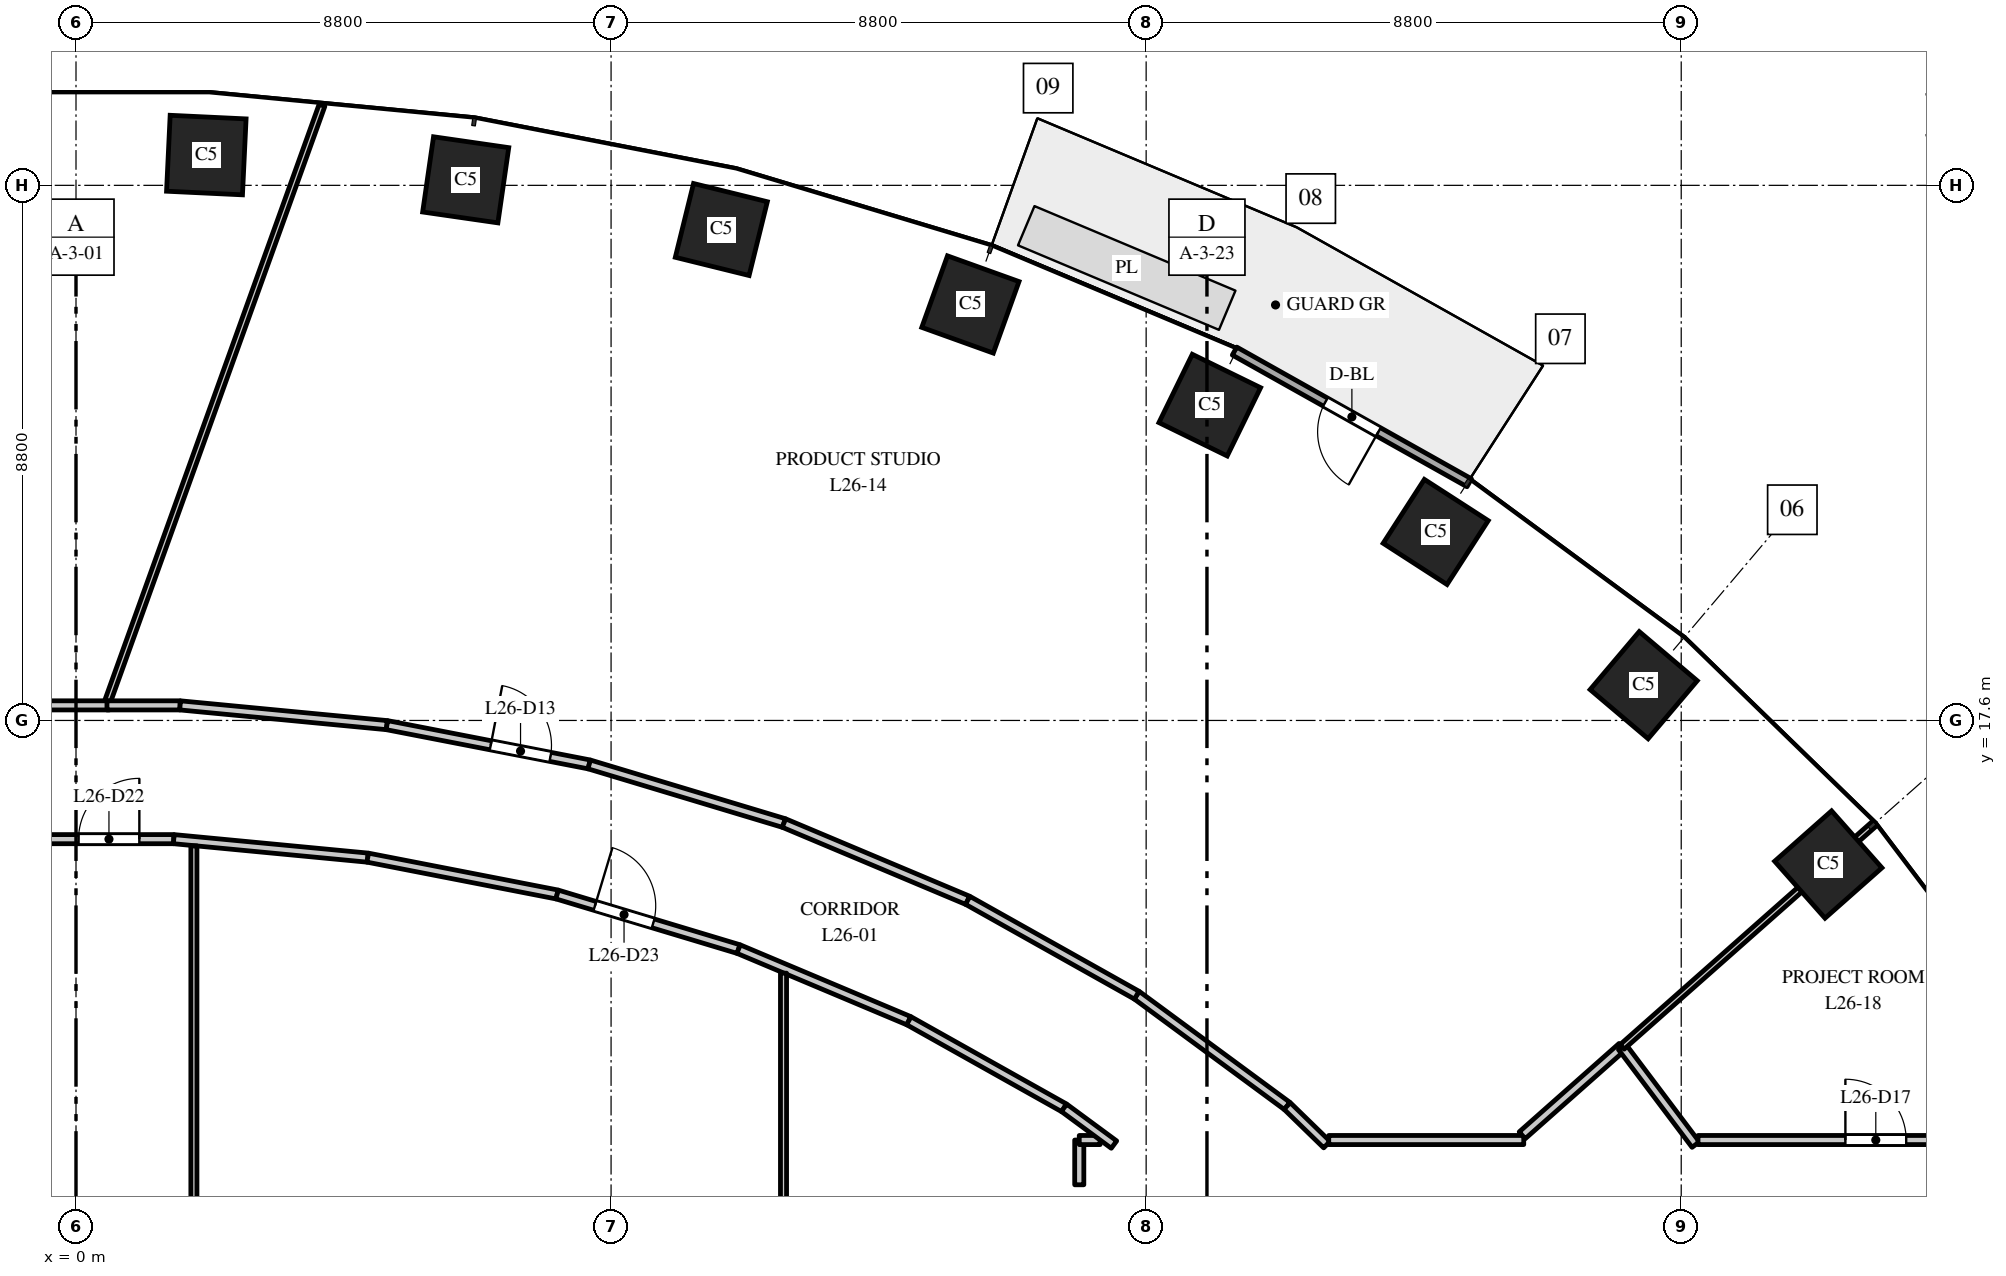
"""IFC4 building model, lengths in metres.
Left out: names, types, materials, properties, quantities, classifications, styles, units other than length and angle.
Written with IfcOpenShell. Run it as: python <this file> out.ifc"""

import sys

from ifc_helpers import new_model, si_unit, direction, frame, frame_2d, origin, origin_2d, place, context, subcontext, project, spatial, rectangle, extrude, element, fill, save


model = new_model("IFC4")
c1 = context("Model", 3, precision=1e-05, world=origin(), true_north=direction((0.0, 1.0)))
c2 = subcontext(c1, "Body", "Model", "MODEL_VIEW")
j1 = project(units=[si_unit("LENGTHUNIT", "METRE"), si_unit("PLANEANGLEUNIT", "RADIAN")], contexts=[c1])
p1 = place(None, origin())
s1 = spatial("IfcSite", under=j1, at=p1, CompositionType="ELEMENT")
p2 = place(p1, origin())
s2 = spatial("IfcBuilding", under=s1, at=p2, CompositionType="ELEMENT")
p3 = place(p2, frame((0.0, 0.0, 116.0)))
s3 = spatial("IfcBuildingStorey", under=s2, at=p3, CompositionType="ELEMENT", Elevation=116.0)
for number, where, z_axis, x_axis in (
    (1, (28.819, 15.23, 0.0), (0.0, 0.0, 1.0), (-0.663, 0.749, 0.0)),
    (2, (25.783, 18.18, 0.0), (0.0, 0.0, 1.0), (-0.763, 0.646, 0.0)),
    (3, (22.362, 20.7, 0.0), (0.0, 0.0, 1.0), (-0.84, 0.542, 0.0)),
    (4, (18.646, 22.785, 0.0), (0.0, 0.0, 1.0), (-0.898, 0.439, 0.0)),
    (5, (14.709, 24.441, 0.0), (0.0, 0.0, 1.0), (-0.941, 0.338, 0.0)),
    (6, (10.613, 25.674, 0.0), (0.0, 0.0, 1.0), (-0.971, 0.24, 0.0)),
    (7, (6.409, 26.491, 0.0), (0.0, 0.0, 1.0), (-0.99, 0.143, 0.0)),
    (8, (2.143, 26.898, 0.0), (0.0, 0.0, 1.0), (-0.999, 0.048, 0.0)),
):
    element("IfcColumn", number, at=place(p3, frame(where, z_axis=z_axis, x_axis=x_axis)), inside=s3, PredefinedType="COLUMN", context=c2, shape_type="SweptSolid", body=[
        extrude(rectangle(XDim=1.25, YDim=1.25, at=origin_2d()), origin(), (0.0, 0.0, 1.0), 4.0),
    ])
p4 = place(p3, frame((22.913, 21.509, 0.0), z_axis=(0.0, 0.0, 1.0), x_axis=(-0.872046572975, 0.489422899509, 0.0)))
e9 = element("IfcWall", 9, at=p4, inside=s3, PredefinedType="STANDARD", context=c2, shape_type="SweptSolid", body=[
    extrude(rectangle(XDim=4.426, YDim=0.15, at=frame_2d((2.213, 0.0))), origin(), (0.0, 0.0, 1.0), 3.7),
])
p5 = place(p4, frame((1.713, 0.0, 0.0)))
e10 = element("IfcOpeningElement", 10, at=p5, cuts=e9, PredefinedType="OPENING", context=c2, shape_type="SweptSolid", body=[
    extrude(rectangle(XDim=1.0, YDim=2.4, at=frame_2d((0.5, 1.2))), frame((0.0, 0.085, 0.0), z_axis=(0.0, -1.0, 0.0), x_axis=(1.0, 0.0, 0.0)), (0.0, 0.0, 1.0), 0.17),
])
p6 = place(p3, frame((-1.712, 17.848, 0.0), z_axis=(0.0, 0.0, 1.0), x_axis=(1.0, 0.0, 0.0)))
e11 = element("IfcWall", 11, at=p6, inside=s3, PredefinedType="PARTITIONING", context=c2, shape_type="SweptSolid", body=[
    extrude(rectangle(XDim=2.262, YDim=0.15, at=frame_2d((1.131, 0.0))), origin(), (0.0, 0.0, 1.0), 2.85),
])
p7 = place(p3, frame((-1.608, 15.648, 0.0), z_axis=(0.0, 0.0, 1.0), x_axis=(1.0, 0.0, 0.0)))
e12 = element("IfcWall", 12, at=p7, inside=s3, PredefinedType="PARTITIONING", context=c2, shape_type="SweptSolid", body=[
    extrude(rectangle(XDim=3.216, YDim=0.15, at=frame_2d((1.608, 0.0))), origin(), (0.0, 0.0, 1.0), 2.85),
])
p8 = place(p7, frame((1.65, 0.0, 0.0)))
e13 = element("IfcOpeningElement", 13, at=p8, cuts=e12, PredefinedType="OPENING", context=c2, shape_type="SweptSolid", body=[
    extrude(rectangle(XDim=1.0, YDim=2.1, at=frame_2d((0.5, 1.05))), frame((0.0, 0.085, 0.0), z_axis=(0.0, -1.0, 0.0), x_axis=(1.0, 0.0, 0.0)), (0.0, 0.0, 1.0), 0.17),
])
p9 = place(p3, frame((0.523, 17.923, 0.0), z_axis=(0.0, 0.0, 1.0), x_axis=(0.338475258228, 0.940975291688, 0.0)))
e14 = element("IfcWall", 14, at=p9, inside=s3, PredefinedType="PARTITIONING", context=c2, shape_type="SweptSolid", body=[
    extrude(rectangle(XDim=10.408, YDim=0.1, at=frame_2d((5.204, 0.0))), origin(), (0.0, 0.0, 1.0), 2.9),
])
p10 = place(p3, frame((0.509, 17.848, 0.0), z_axis=(0.0, 0.0, 1.0), x_axis=(1.0, 0.0, 0.0)))
e15 = element("IfcWall", 15, at=p10, inside=s3, PredefinedType="PARTITIONING", context=c2, shape_type="SweptSolid", body=[
    extrude(rectangle(XDim=1.203, YDim=0.15, at=frame_2d((0.602, 0.0))), origin(), (0.0, 0.0, 1.0), 3.7),
])
p11 = place(p3, frame((1.608, 15.648, 0.0), z_axis=(0.0, 0.0, 1.0), x_axis=(0.995491705426, -0.09484863957, 0.0)))
e16 = element("IfcWall", 16, at=p11, inside=s3, PredefinedType="PARTITIONING", context=c2, shape_type="SweptSolid", body=[
    extrude(rectangle(XDim=3.205, YDim=0.15, at=frame_2d((1.602, 0.0))), origin(), (0.0, 0.0, 1.0), 2.85),
])
p12 = place(p3, frame((1.712, 17.848, 0.0), z_axis=(0.0, 0.0, 1.0), x_axis=(0.995466844572, -0.095109207532, 0.0)))
e17 = element("IfcWall", 17, at=p12, inside=s3, PredefinedType="PARTITIONING", context=c2, shape_type="SweptSolid", body=[
    extrude(rectangle(XDim=3.417, YDim=0.15, at=frame_2d((1.708, 0.0))), origin(), (0.0, 0.0, 1.0), 2.85),
])
p13 = place(p3, frame((1.939, 7.307, 0.0), z_axis=(0.0, 0.0, 1.0), x_axis=(0.0, 1.0, 0.0)))
e18 = element("IfcWall", 18, at=p13, inside=s3, PredefinedType="PARTITIONING", context=c2, shape_type="SweptSolid", body=[
    extrude(rectangle(XDim=8.23, YDim=0.1, at=frame_2d((4.115, 0.0))), origin(), (0.0, 0.0, 1.0), 2.85),
])
p14 = place(p3, frame((4.798, 15.344, 0.0), z_axis=(0.0, 0.0, 1.0), x_axis=(0.981588545092, -0.191007665145, 0.0)))
e19 = element("IfcWall", 19, at=p14, inside=s3, PredefinedType="PARTITIONING", context=c2, shape_type="SweptSolid", body=[
    extrude(rectangle(XDim=3.172, YDim=0.15, at=frame_2d((1.586, 0.0))), origin(), (0.0, 0.0, 1.0), 3.7),
])
p15 = place(p3, frame((5.113, 17.523, 0.0), z_axis=(0.0, 0.0, 1.0), x_axis=(0.981665220565, -0.190613207134, 0.0)))
e20 = element("IfcWall", 20, at=p15, inside=s3, PredefinedType="PARTITIONING", context=c2, shape_type="SweptSolid", body=[
    extrude(rectangle(XDim=3.389, YDim=0.15, at=frame_2d((1.695, 0.0))), origin(), (0.0, 0.0, 1.0), 3.7),
])
p16 = place(p15, frame((1.739, 0.0, 0.0)))
e21 = element("IfcOpeningElement", 21, at=p16, cuts=e20, PredefinedType="OPENING", context=c2, shape_type="SweptSolid", body=[
    extrude(rectangle(XDim=1.0, YDim=2.1, at=frame_2d((0.5, 1.05))), frame((0.0, 0.085, 0.0), z_axis=(0.0, -1.0, 0.0), x_axis=(1.0, 0.0, 0.0)), (0.0, 0.0, 1.0), 0.17),
])
p17 = place(p3, frame((7.912, 14.738, 0.0), z_axis=(0.0, 0.0, 1.0), x_axis=(0.957606118849, -0.28808075455, 0.0)))
e22 = element("IfcWall", 22, at=p17, inside=s3, PredefinedType="PARTITIONING", context=c2, shape_type="SweptSolid", body=[
    extrude(rectangle(XDim=3.117, YDim=0.15, at=frame_2d((1.559, 0.0))), origin(), (0.0, 0.0, 1.0), 2.85),
])
p18 = place(p17, frame((0.65, 0.0, 0.0)))
e23 = element("IfcOpeningElement", 23, at=p18, cuts=e22, PredefinedType="OPENING", context=c2, shape_type="SweptSolid", body=[
    extrude(rectangle(XDim=1.0, YDim=2.1, at=frame_2d((0.5, 1.05))), frame((0.0, 0.085, 0.0), z_axis=(0.0, -1.0, 0.0), x_axis=(1.0, 0.0, 0.0)), (0.0, 0.0, 1.0), 0.17),
])
p19 = place(p3, frame((8.44, 16.877, 0.0), z_axis=(0.0, 0.0, 1.0), x_axis=(0.957584891346, -0.288151307243, 0.0)))
e24 = element("IfcWall", 24, at=p19, inside=s3, PredefinedType="PARTITIONING", context=c2, shape_type="SweptSolid", body=[
    extrude(rectangle(XDim=3.345, YDim=0.15, at=frame_2d((1.672, 0.0))), origin(), (0.0, 0.0, 1.0), 2.85),
])
p20 = place(p3, frame((10.897, 13.84, 0.0), z_axis=(0.0, 0.0, 1.0), x_axis=(0.921751821358, -0.387780324183, 0.0)))
e25 = element("IfcWall", 25, at=p20, inside=s3, PredefinedType="PARTITIONING", context=c2, shape_type="SweptSolid", body=[
    extrude(rectangle(XDim=3.038, YDim=0.15, at=frame_2d((1.519, 0.0))), origin(), (0.0, 0.0, 1.0), 3.7),
])
p21 = place(p3, frame((11.636, -13.444, 0.0), z_axis=(0.0, 0.0, 1.0), x_axis=(0.0, 1.0, 0.0)))
e26 = element("IfcWall", 26, at=p21, inside=s3, PredefinedType="PARTITIONING", context=c2, shape_type="SweptSolid", body=[
    extrude(rectangle(XDim=26.888, YDim=0.1, at=frame_2d((13.444, 0.0))), origin(), (0.0, 0.0, 1.0), 2.75),
])
p22 = place(p3, frame((11.643, 15.913, 0.0), z_axis=(0.0, 0.0, 1.0), x_axis=(0.921789499058, -0.38769075231, 0.0)))
e27 = element("IfcWall", 27, at=p22, inside=s3, PredefinedType="PARTITIONING", context=c2, shape_type="SweptSolid", body=[
    extrude(rectangle(XDim=3.278, YDim=0.15, at=frame_2d((1.639, 0.0))), origin(), (0.0, 0.0, 1.0), 3.7),
])
p23 = place(p3, frame((13.697, 12.662, 0.0), z_axis=(0.0, 0.0, 1.0), x_axis=(0.872147381065, -0.489243237767, 0.0)))
e28 = element("IfcWall", 28, at=p23, inside=s3, PredefinedType="PARTITIONING", context=c2, shape_type="SweptSolid", body=[
    extrude(rectangle(XDim=2.927, YDim=0.15, at=frame_2d((1.464, 0.0))), origin(), (0.0, 0.0, 1.0), 3.7),
])
p24 = place(p3, frame((14.665, 14.642, 0.0), z_axis=(0.0, 0.0, 1.0), x_axis=(0.872072095629, -0.489377420837, 0.0)))
e29 = element("IfcWall", 29, at=p24, inside=s3, PredefinedType="PARTITIONING", context=c2, shape_type="SweptSolid", body=[
    extrude(rectangle(XDim=3.188, YDim=0.15, at=frame_2d((1.594, 0.0))), origin(), (0.0, 0.0, 1.0), 3.7),
])
p25 = place(p3, frame((16.25, 11.23, 0.0), z_axis=(0.0, 0.0, 1.0), x_axis=(0.805055837353, -0.59319903805, 0.0)))
e30 = element("IfcWall", 30, at=p25, inside=s3, PredefinedType="PARTITIONING", context=c2, shape_type="SweptSolid", body=[
    extrude(rectangle(XDim=1.02, YDim=0.15, at=frame_2d((0.51, 0.0))), origin(), (0.0, 0.0, 1.0), 3.7),
])
p26 = place(p3, frame((16.5, 9.964, 0.0), z_axis=(0.0, 0.0, 1.0), x_axis=(0.0, 1.0, 0.0)))
e31 = element("IfcWall", 31, at=p26, inside=s3, PredefinedType="PARTITIONING", context=c2, shape_type="SweptSolid", body=[
    extrude(rectangle(XDim=0.736, YDim=0.15, at=frame_2d((0.368, 0.0))), origin(), (0.0, 0.0, 1.0), 3.7),
])
p27 = place(p3, frame((16.5, 10.7, 0.0), z_axis=(0.0, 0.0, 1.0), x_axis=(1.0, 0.0, 0.0)))
e32 = element("IfcWall", 32, at=p27, inside=s3, PredefinedType="PARTITIONING", context=c2, shape_type="SweptSolid", body=[
    extrude(rectangle(XDim=0.343, YDim=0.15, at=frame_2d((0.171, 0.0))), origin(), (0.0, 0.0, 1.0), 3.7),
])
p28 = place(p3, frame((17.445, 13.082, 0.0), z_axis=(0.0, 0.0, 1.0), x_axis=(0.805185638843, -0.593022838516, 0.0)))
e33 = element("IfcWall", 33, at=p28, inside=s3, PredefinedType="PARTITIONING", context=c2, shape_type="SweptSolid", body=[
    extrude(rectangle(XDim=3.073, YDim=0.15, at=frame_2d((1.536, 0.0))), origin(), (0.0, 0.0, 1.0), 3.7),
])
p29 = place(p3, frame((19.919, 11.26, 0.0), z_axis=(0.0, 0.0, 1.0), x_axis=(0.716953986293, -0.697120492841, 0.0)))
e34 = element("IfcWall", 34, at=p29, inside=s3, PredefinedType="PARTITIONING", context=c2, shape_type="SweptSolid", body=[
    extrude(rectangle(XDim=0.911, YDim=0.15, at=frame_2d((0.456, 0.0))), origin(), (0.0, 0.0, 1.0), 2.75),
])
p30 = place(p3, frame((20.603, 10.7, 0.0), z_axis=(0.0, 0.0, 1.0), x_axis=(1.0, 0.0, 0.0)))
e35 = element("IfcWall", 35, at=p30, inside=s3, PredefinedType="PARTITIONING", context=c2, shape_type="SweptSolid", body=[
    extrude(rectangle(XDim=3.207, YDim=0.15, at=frame_2d((1.604, 0.0))), origin(), (0.0, 0.0, 1.0), 3.7),
])
p31 = place(p3, frame((23.785, 10.778, 0.0), z_axis=(0.0, 0.0, 1.0), x_axis=(0.748911595987, 0.662669918886, 0.0)))
e36 = element("IfcWall", 36, at=p31, inside=s3, PredefinedType="PARTITIONING", context=c2, shape_type="SweptSolid", body=[
    extrude(rectangle(XDim=2.194, YDim=0.15, at=frame_2d((1.097, 0.0))), origin(), (0.0, 0.0, 1.0), 3.7),
])
p32 = place(p3, frame((25.428, 12.232, 0.0), z_axis=(0.0, 0.0, 1.0), x_axis=(0.601513631979, -0.798862535449, 0.0)))
e37 = element("IfcWall", 37, at=p32, inside=s3, PredefinedType="PARTITIONING", context=c2, shape_type="SweptSolid", body=[
    extrude(rectangle(XDim=2.011, YDim=0.15, at=frame_2d((1.006, 0.0))), origin(), (0.0, 0.0, 1.0), 3.7),
])
p33 = place(p3, frame((25.428, 12.232, 0.0), z_axis=(0.0, 0.0, 1.0), x_axis=(0.749015105068, 0.662552920437, 0.0)))
e38 = element("IfcWall", 38, at=p33, inside=s3, PredefinedType="PARTITIONING", context=c2, shape_type="SweptSolid", body=[
    extrude(rectangle(XDim=5.529, YDim=0.1, at=frame_2d((2.764, 0.0))), origin(), (0.0, 0.0, 1.0), 3.7),
])
p34 = place(p3, frame((26.676, 10.7, 0.0), z_axis=(0.0, 0.0, 1.0), x_axis=(1.0, 0.0, 0.0)))
e39 = element("IfcWall", 39, at=p34, inside=s3, PredefinedType="PARTITIONING", context=c2, shape_type="SweptSolid", body=[
    extrude(rectangle(XDim=4.824, YDim=0.15, at=frame_2d((2.412, 0.0))), origin(), (0.0, 0.0, 1.0), 2.9),
])
p35 = place(p34, frame((2.424, 0.0, 0.0)))
e40 = element("IfcOpeningElement", 40, at=p35, cuts=e39, PredefinedType="OPENING", context=c2, shape_type="SweptSolid", body=[
    extrude(rectangle(XDim=1.0, YDim=2.1, at=frame_2d((0.5, 1.05))), frame((0.0, 0.085, 0.0), z_axis=(0.0, -1.0, 0.0), x_axis=(1.0, 0.0, 0.0)), (0.0, 0.0, 1.0), 0.17),
])
p36 = place(p5, origin())
e41 = element("IfcDoor", 41, at=p36, inside=s3, OperationType="SINGLE_SWING_LEFT", PredefinedType="DOOR", context=c2, shape_type="SweptSolid", body=[
    extrude(rectangle(XDim=1.0, YDim=2.4, at=frame_2d((0.5, 1.2))), frame((0.0, 0.025, 0.0), z_axis=(0.0, -1.0, 0.0), x_axis=(1.0, 0.0, 0.0)), (0.0, 0.0, 1.0), 0.05),
])
fill(e10, e41)
p37 = place(p16, origin())
e42 = element("IfcDoor", 42, at=p37, inside=s3, OperationType="SINGLE_SWING_LEFT", PredefinedType="DOOR", context=c2, shape_type="SweptSolid", body=[
    extrude(rectangle(XDim=1.0, YDim=2.1, at=frame_2d((0.5, 1.05))), frame((0.0, 0.025, 0.0), z_axis=(0.0, -1.0, 0.0), x_axis=(1.0, 0.0, 0.0)), (0.0, 0.0, 1.0), 0.05),
])
fill(e21, e42)
p38 = place(p35, origin())
e43 = element("IfcDoor", 43, at=p38, inside=s3, OperationType="SINGLE_SWING_LEFT", PredefinedType="DOOR", context=c2, shape_type="SweptSolid", body=[
    extrude(rectangle(XDim=1.0, YDim=2.1, at=frame_2d((0.5, 1.05))), frame((0.0, 0.025, 0.0), z_axis=(0.0, -1.0, 0.0), x_axis=(1.0, 0.0, 0.0)), (0.0, 0.0, 1.0), 0.05),
])
fill(e40, e43)
p39 = place(p8, origin())
e44 = element("IfcDoor", 44, at=p39, inside=s3, OperationType="SINGLE_SWING_RIGHT", PredefinedType="DOOR", context=c2, shape_type="SweptSolid", body=[
    extrude(rectangle(XDim=1.0, YDim=2.1, at=frame_2d((0.5, 1.05))), frame((0.0, 0.025, 0.0), z_axis=(0.0, -1.0, 0.0), x_axis=(1.0, 0.0, 0.0)), (0.0, 0.0, 1.0), 0.05),
])
fill(e13, e44)
p40 = place(p18, origin())
e45 = element("IfcDoor", 45, at=p40, inside=s3, OperationType="SINGLE_SWING_LEFT", PredefinedType="DOOR", context=c2, shape_type="SweptSolid", body=[
    extrude(rectangle(XDim=1.0, YDim=2.1, at=frame_2d((0.5, 1.05))), frame((0.0, 0.025, 0.0), z_axis=(0.0, -1.0, 0.0), x_axis=(1.0, 0.0, 0.0)), (0.0, 0.0, 1.0), 0.05),
])
fill(e23, e45)
save(model, sys.argv[1])
